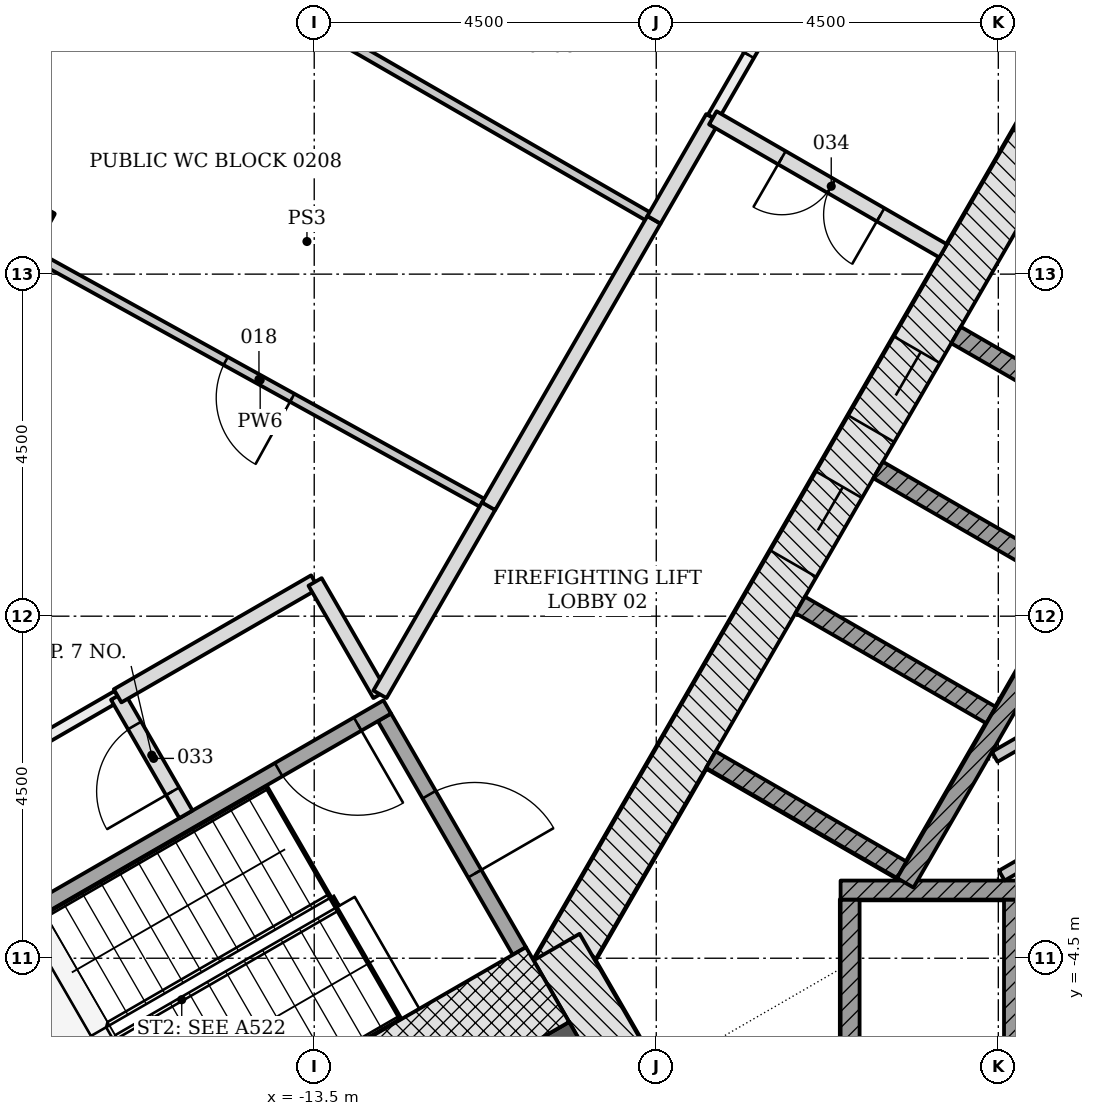
"""IFC4 building model, lengths in metres.
Left out: names, types, materials, properties, quantities, classifications, styles, units other than length and angle.
Written with IfcOpenShell. Run it as: python <this file> out.ifc"""

import sys

from ifc_helpers import new_model, si_unit, direction, frame, frame_2d, origin, origin_2d, place, context, subcontext, project, spatial, polyline, rectangle, outline, extrude, element, fill, save


model = new_model("IFC4")
c1 = context("Model", 3, precision=1e-05, world=origin(), true_north=direction((0.0, 1.0)))
c2 = subcontext(c1, "Body", "Model", "MODEL_VIEW")
j1 = project(units=[si_unit("LENGTHUNIT", "METRE"), si_unit("PLANEANGLEUNIT", "RADIAN")], contexts=[c1])
p1 = place(None, origin())
s1 = spatial("IfcSite", under=j1, at=p1, CompositionType="ELEMENT")
p2 = place(p1, origin())
s2 = spatial("IfcBuilding", under=s1, at=p2, CompositionType="ELEMENT")
p3 = place(p2, frame((0.0, 0.0, 10.5)))
s3 = spatial("IfcBuildingStorey", under=s2, at=p3, CompositionType="ELEMENT", Elevation=10.5)
p4 = place(p3, frame((-17.739, 5.058, -0.25), z_axis=(0.0, 0.0, 1.0), x_axis=(-0.875152760281, 0.483846717641, 0.0)))
e1 = element("IfcColumn", 1, at=p4, inside=s3, PredefinedType="COLUMN", context=c2, shape_type="SweptSolid", body=[
    extrude(rectangle(XDim=1.2, YDim=1.2, at=origin_2d()), origin(), (0.0, 0.0, 1.0), 4.5),
])
p5 = place(p3, frame((-1.083, 11.281, -0.25), z_axis=(0.0, 0.0, 1.0), x_axis=(-0.500001446645, -0.866024568562, 0.0)))
e2 = element("IfcWall", 2, at=p5, inside=s3, PredefinedType="SHEAR", context=c2, shape_type="SweptSolid", body=[
    extrude(rectangle(XDim=18.458, YDim=0.7, at=frame_2d((9.229, 0.0))), origin(), (0.0, 0.0, 1.0), 4.5),
])
p6 = place(p5, frame((8.979, 0.0, 0.25)))
e3 = element("IfcOpeningElement", 3, at=p6, cuts=e2, PredefinedType="OPENING", context=c2, shape_type="SweptSolid", body=[
    extrude(rectangle(XDim=1.2, YDim=2.1, at=frame_2d((0.6, 1.05))), frame((0.0, 0.36, 0.0), z_axis=(0.0, -1.0, 0.0), x_axis=(1.0, 0.0, 0.0)), (0.0, 0.0, 1.0), 0.72),
])
p7 = place(p5, frame((11.029, 0.0, 0.25)))
e4 = element("IfcOpeningElement", 4, at=p7, cuts=e2, PredefinedType="OPENING", context=c2, shape_type="SweptSolid", body=[
    extrude(rectangle(XDim=1.2, YDim=2.1, at=frame_2d((0.6, 1.05))), frame((0.0, 0.36, 0.0), z_axis=(0.0, -1.0, 0.0), x_axis=(1.0, 0.0, 0.0)), (0.0, 0.0, 1.0), 0.72),
])
p8 = place(p3, frame((-10.311, -4.353, -0.25), z_axis=(0.0, 0.0, 1.0), x_axis=(0.500042739161, -0.866000726912, 0.0)))
e5 = element("IfcWall", 5, at=p8, inside=s3, PredefinedType="SHEAR", context=c2, shape_type="SweptSolid", body=[
    extrude(rectangle(XDim=2.771, YDim=0.7, at=frame_2d((1.386, 0.0))), origin(), (0.0, 0.0, 1.0), 4.5),
])
p9 = place(p3, frame((-9.922, -5.728, -0.25), z_axis=(0.0, 0.0, 1.0), x_axis=(-0.866028046028, -0.499995423472, 0.0)))
e6 = element("IfcWall", 6, at=p9, inside=s3, PredefinedType="SHEAR", context=c2, shape_type="SweptSolid", body=[
    extrude(rectangle(XDim=14.633, YDim=0.9, at=frame_2d((7.316, 0.0))), origin(), (0.0, 0.0, 1.0), 4.5),
])
p10 = place(p9, frame((7.35, 0.0, 0.25)))
e7 = element("IfcOpeningElement", 7, at=p10, cuts=e6, PredefinedType="OPENING", context=c2, shape_type="SweptSolid", body=[
    extrude(rectangle(XDim=1.5, YDim=2.1, at=frame_2d((0.75, 1.05))), frame((0.0, 0.46, 0.0), z_axis=(0.0, -1.0, 0.0), x_axis=(1.0, 0.0, 0.0)), (0.0, 0.0, 1.0), 0.92),
])
for number, where, z_axis, x_axis in (
    (8, (-6.45, -6.228, -0.25), (0.0, 0.0, 1.0), (0.0, 1.0, 0.0)),
    (9, (-4.3, -6.228, -0.25), (0.0, 0.0, 1.0), (0.0, 1.0, 0.0)),
):
    element("IfcWall", number, at=place(p3, frame(where, z_axis=z_axis, x_axis=x_axis)), inside=s3, PredefinedType="PARTITIONING", context=c2, shape_type="SweptSolid", body=[
        extrude(rectangle(XDim=2.5, YDim=0.25, at=frame_2d((1.25, 0.0))), origin(), (0.0, 0.0, 1.0), 4.5),
    ])
p11 = place(p3, frame((-6.575, -3.603, 0.0), z_axis=(0.0, 0.0, 1.0), x_axis=(1.0, 0.0, 0.0)))
e10 = element("IfcWall", 10, at=p11, inside=s3, PredefinedType="PARTITIONING", context=c2, shape_type="SweptSolid", body=[
    extrude(rectangle(XDim=13.15, YDim=0.25, at=frame_2d((6.575, 0.0))), origin(), (0.0, 0.0, 1.0), 4.25),
])
for number, where, z_axis, x_axis in (
    (11, (-5.056, 3.699, -0.25), (0.0, 0.0, 1.0), (0.866, -0.5, 0.0)),
    (12, (-6.081, 1.923, -0.25), (0.0, 0.0, 1.0), (0.866, -0.5, 0.0)),
    (13, (-7.106, 0.148, -0.25), (0.0, 0.0, 1.0), (0.866, -0.5, 0.0)),
    (14, (-8.281, -1.887, -0.25), (0.0, 0.0, 1.0), (0.866, -0.5, 0.0)),
):
    element("IfcWall", number, at=place(p3, frame(where, z_axis=z_axis, x_axis=x_axis)), inside=s3, PredefinedType="PARTITIONING", context=c2, shape_type="SweptSolid", body=[
        extrude(rectangle(XDim=2.9, YDim=0.25, at=frame_2d((1.45, 0.0))), origin(), (0.0, 0.0, 1.0), 4.5),
    ])
p12 = place(p3, frame((0.176, 6.711, 0.0), z_axis=(0.0, 0.0, 1.0), x_axis=(-0.500004227369, -0.866022963098, 0.0)))
e15 = element("IfcWall", 15, at=p12, inside=s3, PredefinedType="PARTITIONING", context=c2, shape_type="SweptSolid", body=[
    extrude(rectangle(XDim=11.8, YDim=0.25, at=frame_2d((5.9, 0.0))), origin(), (0.0, 0.0, 1.0), 4.25),
])
p13 = place(p3, frame((-4.548, -1.851, 0.0), z_axis=(0.0, 0.0, 1.0), x_axis=(0.866023939251, 0.500002536638, 0.0)))
e16 = element("IfcWall", 16, at=p13, inside=s3, PredefinedType="PARTITIONING", context=c2, shape_type="SweptSolid", body=[
    extrude(rectangle(XDim=11.092, YDim=0.15, at=frame_2d((5.546, 0.0))), origin(), (0.0, 0.0, 1.0), 4.25),
])
p14 = place(p13, frame((3.497, 0.0, 0.0)))
e17 = element("IfcOpeningElement", 17, at=p14, cuts=e16, PredefinedType="OPENING", context=c2, shape_type="SweptSolid", body=[
    extrude(rectangle(XDim=0.9, YDim=2.1, at=frame_2d((0.45, 1.05))), frame((0.0, 0.085, 0.0), z_axis=(0.0, -1.0, 0.0), x_axis=(1.0, 0.0, 0.0)), (0.0, 0.0, 1.0), 0.17),
])
p15 = place(p3, frame((-4.454, -3.413, 0.0), z_axis=(0.0, 0.0, 1.0), x_axis=(0.86603043987, 0.499991277142, 0.0)))
e18 = element("IfcWall", 18, at=p15, inside=s3, PredefinedType="PARTITIONING", context=c2, shape_type="SweptSolid", body=[
    extrude(rectangle(XDim=11.792, YDim=0.15, at=frame_2d((5.896, 0.0))), origin(), (0.0, 0.0, 1.0), 4.25),
])
p16 = place(p15, frame((3.847, 0.0, 0.0)))
e19 = element("IfcOpeningElement", 19, at=p16, cuts=e18, PredefinedType="OPENING", context=c2, shape_type="SweptSolid", body=[
    extrude(rectangle(XDim=0.9, YDim=2.1, at=frame_2d((0.45, 1.05))), frame((0.0, 0.085, 0.0), z_axis=(0.0, -1.0, 0.0), x_axis=(1.0, 0.0, 0.0)), (0.0, 0.0, 1.0), 0.17),
])
p17 = place(p3, frame((-12.576, -1.331, -0.25), z_axis=(0.0, 0.0, 1.0), x_axis=(0.499970499736, -0.8660424351, 0.0)))
e20 = element("IfcWall", 20, at=p17, inside=s3, PredefinedType="SHEAR", context=c2, shape_type="SweptSolid", body=[
    extrude(rectangle(XDim=3.55, YDim=0.2, at=frame_2d((1.775, 0.0))), origin(), (0.0, 0.0, 1.0), 4.5),
])
p18 = place(p17, frame((1.175, 0.0, 0.25)))
e21 = element("IfcOpeningElement", 21, at=p18, cuts=e20, PredefinedType="OPENING", context=c2, shape_type="SweptSolid", body=[
    extrude(rectangle(XDim=1.2, YDim=2.1, at=frame_2d((0.6, 1.05))), frame((0.0, 0.11, 0.0), z_axis=(0.0, -1.0, 0.0), x_axis=(1.0, 0.0, 0.0)), (0.0, 0.0, 1.0), 0.22),
])
p19 = place(p3, frame((-12.539, -1.194, -0.25), z_axis=(0.0, 0.0, 1.0), x_axis=(-0.866045472092, -0.499965239061, 0.0)))
e22 = element("IfcWall", 22, at=p19, inside=s3, PredefinedType="SHEAR", context=c2, shape_type="SweptSolid", body=[
    extrude(rectangle(XDim=5.6, YDim=0.2, at=frame_2d((2.8, 0.0))), origin(), (0.0, 0.0, 1.0), 4.5),
])
p20 = place(p19, frame((0.45, 0.0, 0.25)))
e23 = element("IfcOpeningElement", 23, at=p20, cuts=e22, PredefinedType="OPENING", context=c2, shape_type="SweptSolid", body=[
    extrude(rectangle(XDim=1.2, YDim=2.1, at=frame_2d((0.6, 1.05))), frame((0.0, 0.11, 0.0), z_axis=(0.0, -1.0, 0.0), x_axis=(1.0, 0.0, 0.0)), (0.0, 0.0, 1.0), 0.22),
])
p21 = place(p3, frame((-10.43, -4.847, -0.25), z_axis=(0.0, 0.0, 1.0), x_axis=(-0.866018442252, -0.500012057535, 0.0)))
e24 = element("IfcWall", 24, at=p21, inside=s3, PredefinedType="SHEAR", context=c2, shape_type="SweptSolid", body=[
    extrude(rectangle(XDim=7.2, YDim=1.136, at=frame_2d((3.6, 0.0))), origin(), (0.0, 0.0, 1.0), 4.5),
])
p22 = place(p3, frame((0.0, 0.0, -0.25)))
e25 = element("IfcWall", 25, at=p22, inside=s3, PredefinedType="SHEAR", context=c2, shape_type="SweptSolid", body=[
    extrude(outline(polyline([(-17.439, -3.907), (-18.025, -6.093), (-16.95, -7.955), (-16.777, -7.855), (-17.81, -6.065), (-17.267, -4.039), (-17.339, -4.081), (-17.339, -4.081), (-17.339, -4.081), (-17.339, -4.081), (-17.339, -4.081), (-17.339, -4.081), (-17.339, -4.081), (-17.339, -4.081), (-17.339, -4.081), (-17.339, -4.081), (-17.339, -4.081), (-17.339, -4.081), (-17.339, -4.081), (-17.339, -4.081), (-17.339, -4.081), (-17.339, -4.081), (-17.339, -4.081), (-17.439, -3.907)])), origin(), (0.0, 0.0, 1.0), 4.5),
])
p23 = place(p3, frame((-16.088, -1.049, 0.0), z_axis=(0.0, 0.0, 1.0), x_axis=(-0.866023883975, -0.500002632377, 0.0)))
e26 = element("IfcWall", 26, at=p23, inside=s3, PredefinedType="PARTITIONING", context=c2, shape_type="SweptSolid", body=[
    extrude(rectangle(XDim=5.104, YDim=0.15, at=frame_2d((2.552, 0.0))), origin(), (0.0, 0.0, 1.0), 3.638),
])
p24 = place(p23, frame((1.65, 0.0, 0.0)))
e27 = element("IfcOpeningElement", 27, at=p24, cuts=e26, PredefinedType="OPENING", context=c2, shape_type="SweptSolid", body=[
    extrude(rectangle(XDim=1.8, YDim=2.1, at=frame_2d((0.9, 1.05))), frame((0.0, 0.085, 0.0), z_axis=(0.0, -1.0, 0.0), x_axis=(1.0, 0.0, 0.0)), (0.0, 0.0, 1.0), 0.17),
])
p25 = place(p3, frame((-15.188, -2.607, 0.0), z_axis=(0.0, 0.0, 1.0), x_axis=(-0.500024172624, 0.866011447264, 0.0)))
e28 = element("IfcWall", 28, at=p25, inside=s3, PredefinedType="PARTITIONING", context=c2, shape_type="SweptSolid", body=[
    extrude(rectangle(XDim=1.798, YDim=0.2, at=frame_2d((0.899, 0.0))), origin(), (0.0, 0.0, 1.0), 3.638),
])
p26 = place(p25, frame((0.35, 0.0, 0.0)))
e29 = element("IfcOpeningElement", 29, at=p26, cuts=e28, PredefinedType="OPENING", context=c2, shape_type="SweptSolid", body=[
    extrude(rectangle(XDim=1.0, YDim=2.1, at=frame_2d((0.5, 1.05))), frame((0.0, 0.11, 0.0), z_axis=(0.0, -1.0, 0.0), x_axis=(1.0, 0.0, 0.0)), (0.0, 0.0, 1.0), 0.22),
])
p27 = place(p3, frame((-16.087, -1.048, 0.0), z_axis=(0.0, 0.0, 1.0), x_axis=(0.865988915629, 0.500063194015, 0.0)))
e30 = element("IfcWall", 30, at=p27, inside=s3, PredefinedType="PARTITIONING", context=c2, shape_type="SweptSolid", body=[
    extrude(rectangle(XDim=2.998, YDim=0.2, at=frame_2d((1.499, 0.0))), origin(), (0.0, 0.0, 1.0), 3.638),
])
p28 = place(p3, frame((-13.489, 0.451, 0.0), z_axis=(0.0, 0.0, 1.0), x_axis=(0.500044178772, -0.865999895656, 0.0)))
e31 = element("IfcWall", 31, at=p28, inside=s3, PredefinedType="PARTITIONING", context=c2, shape_type="SweptSolid", body=[
    extrude(rectangle(XDim=1.708, YDim=0.2, at=frame_2d((0.854, 0.0))), origin(), (0.0, 0.0, 1.0), 4.25),
])
p29 = place(p3, frame((-12.635, -1.028, 0.0), z_axis=(0.0, 0.0, 1.0), x_axis=(0.499801250411, 0.866140121509, 0.0)))
e32 = element("IfcWall", 32, at=p29, inside=s3, PredefinedType="PARTITIONING", context=c2, shape_type="SweptSolid", body=[
    extrude(rectangle(XDim=2.861, YDim=0.2, at=frame_2d((1.431, 0.0))), origin(), (0.0, 0.0, 1.0), 3.638),
])
p30 = place(p3, frame((-11.208, 1.446, 0.0), z_axis=(0.0, 0.0, 1.0), x_axis=(-0.875125393946, 0.483896212912, 0.0)))
e33 = element("IfcWall", 33, at=p30, inside=s3, PredefinedType="PARTITIONING", context=c2, shape_type="SweptSolid", body=[
    extrude(rectangle(XDim=6.863, YDim=0.12, at=frame_2d((3.432, 0.0))), origin(), (0.0, 0.0, 1.0), 3.638),
])
p31 = place(p30, frame((2.95, 0.0, 0.0)))
e34 = element("IfcOpeningElement", 34, at=p31, cuts=e33, PredefinedType="OPENING", context=c2, shape_type="SweptSolid", body=[
    extrude(rectangle(XDim=1.0, YDim=2.1, at=frame_2d((0.5, 1.05))), frame((0.0, 0.07, 0.0), z_axis=(0.0, -1.0, 0.0), x_axis=(1.0, 0.0, 0.0)), (0.0, 0.0, 1.0), 0.14),
])
p32 = place(p3, frame((-9.031, 5.213, 0.0), z_axis=(0.0, 0.0, 1.0), x_axis=(-0.500044734646, -0.865999574684, 0.0)))
e35 = element("IfcWall", 35, at=p32, inside=s3, PredefinedType="PARTITIONING", context=c2, shape_type="SweptSolid", body=[
    extrude(rectangle(XDim=4.35, YDim=0.2, at=frame_2d((2.175, 0.0))), origin(), (0.0, 0.0, 1.0), 3.638),
])
p33 = place(p3, frame((-8.256, 6.556, 0.0), z_axis=(0.0, 0.0, 1.0), x_axis=(-0.499904469662, -0.866080551226, 0.0)))
e36 = element("IfcWall", 36, at=p33, inside=s3, PredefinedType="PARTITIONING", context=c2, shape_type="SweptSolid", body=[
    extrude(rectangle(XDim=1.548, YDim=0.2, at=frame_2d((0.774, 0.0))), origin(), (0.0, 0.0, 1.0), 3.638),
])
p34 = place(p3, frame((-5.226, 4.806, 0.0), z_axis=(0.0, 0.0, 1.0), x_axis=(-0.865949687125, 0.500131122175, 0.0)))
e37 = element("IfcWall", 37, at=p34, inside=s3, PredefinedType="PARTITIONING", context=c2, shape_type="SweptSolid", body=[
    extrude(rectangle(XDim=3.499, YDim=0.2, at=frame_2d((1.75, 0.0))), origin(), (0.0, 0.0, 1.0), 4.25),
])
p35 = place(p34, frame((0.95, 0.0, 0.0)))
e38 = element("IfcOpeningElement", 38, at=p35, cuts=e37, PredefinedType="OPENING", context=c2, shape_type="SweptSolid", body=[
    extrude(rectangle(XDim=1.5, YDim=2.1, at=frame_2d((0.75, 1.05))), frame((0.0, 0.11, 0.0), z_axis=(0.0, -1.0, 0.0), x_axis=(1.0, 0.0, 0.0)), (0.0, 0.0, 1.0), 0.22),
])
p36 = place(p3, frame((-9.032, 5.215, 0.0), z_axis=(0.0, 0.0, 1.0), x_axis=(-0.866130767322, 0.499817460578, 0.0)))
e39 = element("IfcWall", 39, at=p36, inside=s3, PredefinedType="PARTITIONING", context=c2, shape_type="SweptSolid", body=[
    extrude(rectangle(XDim=4.597, YDim=0.12, at=frame_2d((2.299, 0.0))), origin(), (0.0, 0.0, 1.0), 3.638),
])
p37 = place(p3, frame((-8.256, 6.558, 0.0), z_axis=(0.0, 0.0, 1.0), x_axis=(0.500081734942, 0.86597820895, 0.0)))
e40 = element("IfcWall", 40, at=p37, inside=s3, PredefinedType="PARTITIONING", context=c2, shape_type="SweptSolid", body=[
    extrude(rectangle(XDim=2.804, YDim=0.15, at=frame_2d((1.402, 0.0))), origin(), (0.0, 0.0, 1.0), 3.638),
])
p38 = place(p37, frame((0.95, 0.0, 0.0)))
e41 = element("IfcOpeningElement", 41, at=p38, cuts=e40, PredefinedType="OPENING", context=c2, shape_type="SweptSolid", body=[
    extrude(rectangle(XDim=1.0, YDim=2.1, at=frame_2d((0.5, 1.05))), frame((0.0, 0.085, 0.0), z_axis=(0.0, -1.0, 0.0), x_axis=(1.0, 0.0, 0.0)), (0.0, 0.0, 1.0), 0.17),
])
p39 = place(p6, origin())
e42 = element("IfcDoor", 42, at=p39, inside=s3, OperationType="DOUBLE_DOOR_SLIDING", PredefinedType="DOOR", context=c2, shape_type="SweptSolid", body=[
    extrude(rectangle(XDim=1.2, YDim=2.1, at=frame_2d((0.6, 1.05))), frame((0.0, 0.025, 0.0), z_axis=(0.0, -1.0, 0.0), x_axis=(1.0, 0.0, 0.0)), (0.0, 0.0, 1.0), 0.05),
])
fill(e3, e42)
p40 = place(p7, origin())
e43 = element("IfcDoor", 43, at=p40, inside=s3, OperationType="DOUBLE_DOOR_SLIDING", PredefinedType="DOOR", context=c2, shape_type="SweptSolid", body=[
    extrude(rectangle(XDim=1.2, YDim=2.1, at=frame_2d((0.6, 1.05))), frame((0.0, 0.025, 0.0), z_axis=(0.0, -1.0, 0.0), x_axis=(1.0, 0.0, 0.0)), (0.0, 0.0, 1.0), 0.05),
])
fill(e4, e43)
p41 = place(p18, origin())
e44 = element("IfcDoor", 44, at=p41, inside=s3, OperationType="SINGLE_SWING_RIGHT", PredefinedType="DOOR", context=c2, shape_type="SweptSolid", body=[
    extrude(rectangle(XDim=1.2, YDim=2.1, at=frame_2d((0.6, 1.05))), frame((0.0, 0.025, 0.0), z_axis=(0.0, -1.0, 0.0), x_axis=(1.0, 0.0, 0.0)), (0.0, 0.0, 1.0), 0.05),
])
fill(e21, e44)
p42 = place(p20, origin())
e45 = element("IfcDoor", 45, at=p42, inside=s3, OperationType="SINGLE_SWING_LEFT", PredefinedType="DOOR", context=c2, shape_type="SweptSolid", body=[
    extrude(rectangle(XDim=1.2, YDim=2.1, at=frame_2d((0.6, 1.05))), frame((0.0, 0.025, 0.0), z_axis=(0.0, -1.0, 0.0), x_axis=(1.0, 0.0, 0.0)), (0.0, 0.0, 1.0), 0.05),
])
fill(e23, e45)
p43 = place(p31, origin())
e46 = element("IfcDoor", 46, at=p43, inside=s3, OperationType="SINGLE_SWING_LEFT", PredefinedType="DOOR", context=c2, shape_type="SweptSolid", body=[
    extrude(rectangle(XDim=1.0, YDim=2.1, at=frame_2d((0.5, 1.05))), frame((0.0, 0.025, 0.0), z_axis=(0.0, -1.0, 0.0), x_axis=(1.0, 0.0, 0.0)), (0.0, 0.0, 1.0), 0.05),
])
fill(e34, e46)
p44 = place(p38, origin())
e47 = element("IfcDoor", 47, at=p44, inside=s3, OperationType="SINGLE_SWING_RIGHT", PredefinedType="DOOR", context=c2, shape_type="SweptSolid", body=[
    extrude(rectangle(XDim=1.0, YDim=2.1, at=frame_2d((0.5, 1.05))), frame((0.0, 0.025, 0.0), z_axis=(0.0, -1.0, 0.0), x_axis=(1.0, 0.0, 0.0)), (0.0, 0.0, 1.0), 0.05),
])
fill(e41, e47)
p45 = place(p26, origin())
e48 = element("IfcDoor", 48, at=p45, inside=s3, OperationType="SINGLE_SWING_LEFT", PredefinedType="DOOR", context=c2, shape_type="SweptSolid", body=[
    extrude(rectangle(XDim=1.0, YDim=2.1, at=frame_2d((0.5, 1.05))), frame((0.0, 0.025, 0.0), z_axis=(0.0, -1.0, 0.0), x_axis=(1.0, 0.0, 0.0)), (0.0, 0.0, 1.0), 0.05),
])
fill(e29, e48)
p46 = place(p35, origin())
e49 = element("IfcDoor", 49, at=p46, inside=s3, OperationType="DOUBLE_DOOR_SINGLE_SWING", PredefinedType="DOOR", context=c2, shape_type="SweptSolid", body=[
    extrude(rectangle(XDim=1.5, YDim=2.1, at=frame_2d((0.75, 1.05))), frame((0.0, 0.025, 0.0), z_axis=(0.0, -1.0, 0.0), x_axis=(1.0, 0.0, 0.0)), (0.0, 0.0, 1.0), 0.05),
])
fill(e38, e49)
save(model, sys.argv[1])
